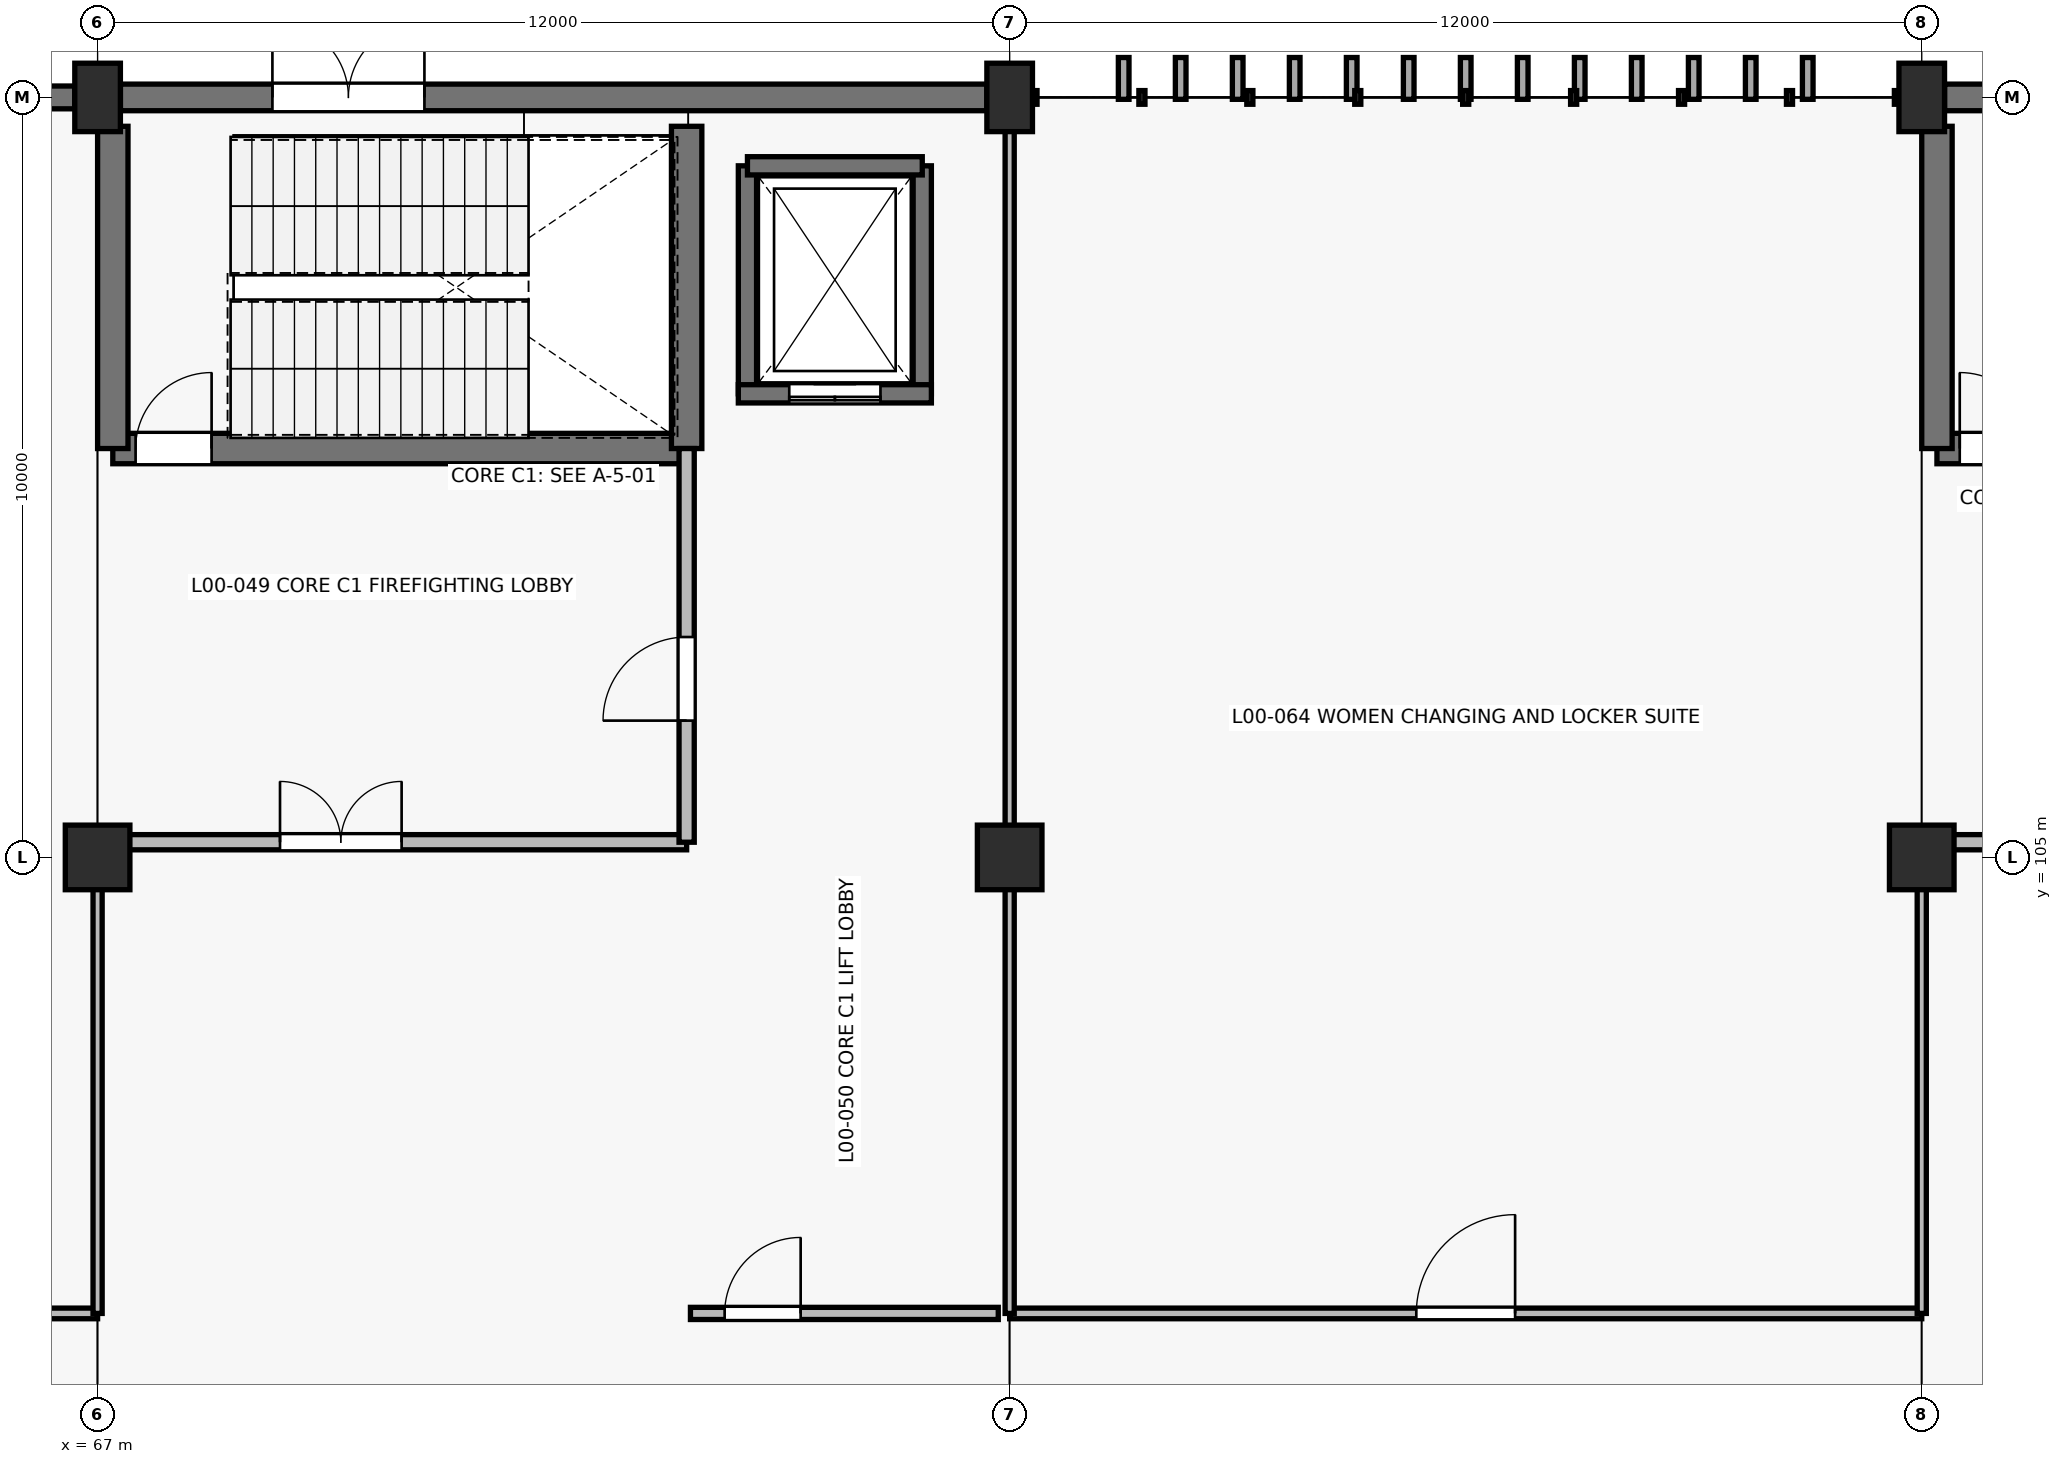
"""IFC4 building model, lengths in metres.
Left out: names, types, materials, properties, quantities, classifications, styles, units other than length and angle.
Written with IfcOpenShell. Run it as: python <this file> out.ifc"""

import sys

from ifc_helpers import new_model, si_unit, direction, frame, frame_2d, origin, origin_2d, place, context, subcontext, project, spatial, rectangle, extrude, element, fill, save


model = new_model("IFC4")
c1 = context("Model", 3, precision=1e-05, world=origin(), true_north=direction((0.0, 1.0)))
c2 = subcontext(c1, "Body", "Model", "MODEL_VIEW")
j1 = project(units=[si_unit("LENGTHUNIT", "METRE"), si_unit("PLANEANGLEUNIT", "RADIAN")], contexts=[c1])
p1 = place(None, origin())
s1 = spatial("IfcSite", under=j1, at=p1, CompositionType="ELEMENT")
p2 = place(p1, origin())
s2 = spatial("IfcBuilding", under=s1, at=p2, CompositionType="ELEMENT")
p3 = place(p2, origin())
s3 = spatial("IfcBuildingStorey", under=s2, at=p3, CompositionType="ELEMENT", Elevation=0.0)
p4 = place(p3, frame((67.0, 105.0, 0.0), z_axis=(0.0, 0.0, 1.0), x_axis=(1.0, 0.0, 0.0)))
e1 = element("IfcColumn", 1, at=p4, inside=s3, PredefinedType="COLUMN", context=c2, shape_type="SweptSolid", body=[
    extrude(rectangle(XDim=0.85, YDim=0.85, at=origin_2d()), origin(), (0.0, 0.0, 1.0), 4.8),
])
p5 = place(p3, frame((67.0, 115.0, 0.0), z_axis=(0.0, 0.0, 1.0), x_axis=(1.0, 0.0, 0.0)))
e2 = element("IfcColumn", 2, at=p5, inside=s3, PredefinedType="COLUMN", context=c2, shape_type="SweptSolid", body=[
    extrude(rectangle(XDim=0.6, YDim=0.9, at=origin_2d()), origin(), (0.0, 0.0, 1.0), 4.8),
])
p6 = place(p3, frame((79.0, 105.0, 0.0), z_axis=(0.0, 0.0, 1.0), x_axis=(1.0, 0.0, 0.0)))
e3 = element("IfcColumn", 3, at=p6, inside=s3, PredefinedType="COLUMN", context=c2, shape_type="SweptSolid", body=[
    extrude(rectangle(XDim=0.85, YDim=0.85, at=origin_2d()), origin(), (0.0, 0.0, 1.0), 4.8),
])
p7 = place(p3, frame((79.0, 115.0, 0.0), z_axis=(0.0, 0.0, 1.0), x_axis=(1.0, 0.0, 0.0)))
e4 = element("IfcColumn", 4, at=p7, inside=s3, PredefinedType="COLUMN", context=c2, shape_type="SweptSolid", body=[
    extrude(rectangle(XDim=0.6, YDim=0.9, at=origin_2d()), origin(), (0.0, 0.0, 1.0), 4.8),
])
p8 = place(p3, frame((91.0, 105.0, 0.0), z_axis=(0.0, 0.0, 1.0), x_axis=(1.0, 0.0, 0.0)))
e5 = element("IfcColumn", 5, at=p8, inside=s3, PredefinedType="COLUMN", context=c2, shape_type="SweptSolid", body=[
    extrude(rectangle(XDim=0.85, YDim=0.85, at=origin_2d()), origin(), (0.0, 0.0, 1.0), 4.8),
])
p9 = place(p3, frame((91.0, 115.0, 0.0), z_axis=(0.0, 0.0, 1.0), x_axis=(1.0, 0.0, 0.0)))
e6 = element("IfcColumn", 6, at=p9, inside=s3, PredefinedType="COLUMN", context=c2, shape_type="SweptSolid", body=[
    extrude(rectangle(XDim=0.6, YDim=0.9, at=origin_2d()), origin(), (0.0, 0.0, 1.0), 4.8),
])
p10 = place(p3, frame((55.3, 115.0, 0.0), z_axis=(0.0, 0.0, 1.0), x_axis=(1.0, 0.0, 0.0)))
e7 = element("IfcWall", 7, at=p10, inside=s3, PredefinedType="SOLIDWALL", context=c2, shape_type="SweptSolid", body=[
    extrude(rectangle(XDim=11.4, YDim=0.3, at=frame_2d((5.7, 0.0))), origin(), (0.0, 0.0, 1.0), 4.8),
])
p11 = place(p10, frame((4.2, 0.0, 0.0)))
e8 = element("IfcOpeningElement", 8, at=p11, cuts=e7, PredefinedType="OPENING", context=c2, shape_type="SweptSolid", body=[
    extrude(rectangle(XDim=2.2, YDim=2.4, at=frame_2d((1.1, 1.2))), frame((0.0, 0.16, 0.0), z_axis=(0.0, -1.0, 0.0), x_axis=(1.0, 0.0, 0.0)), (0.0, 0.0, 1.0), 0.32),
])
p12 = place(p3, frame((67.3, 115.0, 0.0), z_axis=(0.0, 0.0, 1.0), x_axis=(1.0, 0.0, 0.0)))
e9 = element("IfcWall", 9, at=p12, inside=s3, PredefinedType="SOLIDWALL", context=c2, shape_type="SweptSolid", body=[
    extrude(rectangle(XDim=11.4, YDim=0.35, at=frame_2d((5.7, 0.0))), origin(), (0.0, 0.0, 1.0), 4.8),
])
p13 = place(p12, frame((2.0, 0.0, 0.0)))
e10 = element("IfcOpeningElement", 10, at=p13, cuts=e9, PredefinedType="OPENING", context=c2, shape_type="SweptSolid", body=[
    extrude(rectangle(XDim=2.0, YDim=2.3, at=frame_2d((1.0, 1.15))), frame((0.0, 0.185, 0.0), z_axis=(0.0, -1.0, 0.0), x_axis=(1.0, 0.0, 0.0)), (0.0, 0.0, 1.0), 0.37),
])
p14 = place(p3, frame((91.3, 115.0, 0.0), z_axis=(0.0, 0.0, 1.0), x_axis=(1.0, 0.0, 0.0)))
e11 = element("IfcWall", 11, at=p14, inside=s3, PredefinedType="SOLIDWALL", context=c2, shape_type="SweptSolid", body=[
    extrude(rectangle(XDim=9.4, YDim=0.35, at=frame_2d((4.7, 0.0))), origin(), (0.0, 0.0, 1.0), 4.8),
])
p15 = place(p14, frame((2.0, 0.0, 0.0)))
e12 = element("IfcOpeningElement", 12, at=p15, cuts=e11, PredefinedType="OPENING", context=c2, shape_type="SweptSolid", body=[
    extrude(rectangle(XDim=2.0, YDim=2.3, at=frame_2d((1.0, 1.15))), frame((0.0, 0.185, 0.0), z_axis=(0.0, -1.0, 0.0), x_axis=(1.0, 0.0, 0.0)), (0.0, 0.0, 1.0), 0.37),
])
for number, where, z_axis, x_axis in (
    (13, (75.55, 111.1, 0.0), (0.0, 0.0, 1.0), (0.0, 1.0, 0.0)),
    (14, (77.85, 114.1, 0.0), (0.0, 0.0, 1.0), (0.0, -1.0, 0.0)),
):
    element("IfcWall", number, at=place(p3, frame(where, z_axis=z_axis, x_axis=x_axis)), inside=s3, PredefinedType="SHEAR", context=c2, shape_type="SweptSolid", body=[
        extrude(rectangle(XDim=3.0, YDim=0.24, at=frame_2d((1.5, 0.0))), origin(), (0.0, 0.0, 1.0), 4.8),
    ])
p16 = place(p3, frame((75.55, 114.1, 0.0), z_axis=(0.0, 0.0, 1.0), x_axis=(1.0, 0.0, 0.0)))
e15 = element("IfcWall", 15, at=p16, inside=s3, PredefinedType="SHEAR", context=c2, shape_type="SweptSolid", body=[
    extrude(rectangle(XDim=2.3, YDim=0.24, at=frame_2d((1.15, 0.0))), origin(), (0.0, 0.0, 1.0), 4.8),
])
p17 = place(p3, frame((77.97, 111.1, 0.0), z_axis=(0.0, 0.0, 1.0), x_axis=(-1.0, 0.0, 0.0)))
e16 = element("IfcWall", 16, at=p17, inside=s3, PredefinedType="SHEAR", context=c2, shape_type="SweptSolid", body=[
    extrude(rectangle(XDim=2.54, YDim=0.24, at=frame_2d((1.27, 0.0))), origin(), (0.0, 0.0, 1.0), 4.8),
])
p18 = place(p17, frame((0.67, 0.0, 0.0)))
e17 = element("IfcOpeningElement", 17, at=p18, cuts=e16, PredefinedType="OPENING", context=c2, shape_type="SweptSolid", body=[
    extrude(rectangle(XDim=1.2, YDim=2.15, at=frame_2d((0.6, 1.075))), frame((0.0, 0.13, 0.0), z_axis=(0.0, -1.0, 0.0), x_axis=(1.0, 0.0, 0.0)), (0.0, 0.0, 1.0), 0.26),
])
p19 = place(p3, frame((67.2, 110.38, 0.0), z_axis=(0.0, 0.0, 1.0), x_axis=(1.0, 0.0, 0.0)))
e18 = element("IfcWall", 18, at=p19, inside=s3, PredefinedType="SHEAR", context=c2, shape_type="SweptSolid", body=[
    extrude(rectangle(XDim=7.55, YDim=0.4, at=frame_2d((3.775, 0.0))), origin(), (0.0, 0.0, 1.0), 4.8),
])
p20 = place(p19, frame((0.3, 0.0, 0.0)))
e19 = element("IfcOpeningElement", 19, at=p20, cuts=e18, PredefinedType="OPENING", context=c2, shape_type="SweptSolid", body=[
    extrude(rectangle(XDim=1.0, YDim=2.15, at=frame_2d((0.5, 1.075))), frame((0.0, 0.21, 0.0), z_axis=(0.0, -1.0, 0.0), x_axis=(1.0, 0.0, 0.0)), (0.0, 0.0, 1.0), 0.42),
])
for number, where, z_axis, x_axis in (
    (20, (74.75, 110.38, 0.0), (0.0, 0.0, 1.0), (0.0, 1.0, 0.0)),
    (21, (67.2, 114.62, 0.0), (0.0, 0.0, 1.0), (0.0, -1.0, 0.0)),
):
    element("IfcWall", number, at=place(p3, frame(where, z_axis=z_axis, x_axis=x_axis)), inside=s3, PredefinedType="SHEAR", context=c2, shape_type="SweptSolid", body=[
        extrude(rectangle(XDim=4.24, YDim=0.4, at=frame_2d((2.12, 0.0))), origin(), (0.0, 0.0, 1.0), 4.8),
    ])
p21 = place(p3, frame((67.2, 105.2, 0.0), z_axis=(0.0, 0.0, 1.0), x_axis=(1.0, 0.0, 0.0)))
e22 = element("IfcWall", 22, at=p21, inside=s3, PredefinedType="PARTITIONING", context=c2, shape_type="SweptSolid", body=[
    extrude(rectangle(XDim=7.55, YDim=0.2, at=frame_2d((3.775, 0.0))), origin(), (0.0, 0.0, 1.0), 3.525),
])
p22 = place(p21, frame((2.2, 0.0, 0.0)))
e23 = element("IfcOpeningElement", 23, at=p22, cuts=e22, PredefinedType="OPENING", context=c2, shape_type="SweptSolid", body=[
    extrude(rectangle(XDim=1.6, YDim=2.2, at=frame_2d((0.8, 1.1))), frame((0.0, 0.11, 0.0), z_axis=(0.0, -1.0, 0.0), x_axis=(1.0, 0.0, 0.0)), (0.0, 0.0, 1.0), 0.22),
])
p23 = place(p3, frame((74.75, 105.2, 0.0), z_axis=(0.0, 0.0, 1.0), x_axis=(0.0, 1.0, 0.0)))
e24 = element("IfcWall", 24, at=p23, inside=s3, PredefinedType="PARTITIONING", context=c2, shape_type="SweptSolid", body=[
    extrude(rectangle(XDim=5.18, YDim=0.2, at=frame_2d((2.59, 0.0))), origin(), (0.0, 0.0, 1.0), 3.625),
])
p24 = place(p23, frame((1.6, 0.0, 0.0)))
e25 = element("IfcOpeningElement", 25, at=p24, cuts=e24, PredefinedType="OPENING", context=c2, shape_type="SweptSolid", body=[
    extrude(rectangle(XDim=1.1, YDim=2.15, at=frame_2d((0.55, 1.075))), frame((0.0, 0.11, 0.0), z_axis=(0.0, -1.0, 0.0), x_axis=(1.0, 0.0, 0.0)), (0.0, 0.0, 1.0), 0.22),
])
p25 = place(p3, frame((74.8, 99.0, 0.0), z_axis=(0.0, 0.0, 1.0), x_axis=(1.0, 0.0, 0.0)))
e26 = element("IfcWall", 26, at=p25, inside=s3, PredefinedType="PARTITIONING", context=c2, shape_type="SweptSolid", body=[
    extrude(rectangle(XDim=4.05, YDim=0.16, at=frame_2d((2.025, 0.0))), origin(), (0.0, 0.0, 1.0), 3.525),
])
p26 = place(p25, frame((0.45, 0.0, 0.0)))
e27 = element("IfcOpeningElement", 27, at=p26, cuts=e26, PredefinedType="OPENING", context=c2, shape_type="SweptSolid", body=[
    extrude(rectangle(XDim=1.0, YDim=2.15, at=frame_2d((0.5, 1.075))), frame((0.0, 0.09, 0.0), z_axis=(0.0, -1.0, 0.0), x_axis=(1.0, 0.0, 0.0)), (0.0, 0.0, 1.0), 0.18),
])
p27 = place(p3, frame((91.2, 110.38, 0.0), z_axis=(0.0, 0.0, 1.0), x_axis=(1.0, 0.0, 0.0)))
e28 = element("IfcWall", 28, at=p27, inside=s3, PredefinedType="SHEAR", context=c2, shape_type="SweptSolid", body=[
    extrude(rectangle(XDim=7.1, YDim=0.4, at=frame_2d((3.55, 0.0))), origin(), (0.0, 0.0, 1.0), 4.8),
])
p28 = place(p27, frame((0.3, 0.0, 0.0)))
e29 = element("IfcOpeningElement", 29, at=p28, cuts=e28, PredefinedType="OPENING", context=c2, shape_type="SweptSolid", body=[
    extrude(rectangle(XDim=1.0, YDim=2.15, at=frame_2d((0.5, 1.075))), frame((0.0, 0.21, 0.0), z_axis=(0.0, -1.0, 0.0), x_axis=(1.0, 0.0, 0.0)), (0.0, 0.0, 1.0), 0.42),
])
p29 = place(p3, frame((91.2, 114.62, 0.0), z_axis=(0.0, 0.0, 1.0), x_axis=(0.0, -1.0, 0.0)))
e30 = element("IfcWall", 30, at=p29, inside=s3, PredefinedType="SHEAR", context=c2, shape_type="SweptSolid", body=[
    extrude(rectangle(XDim=4.24, YDim=0.4, at=frame_2d((2.12, 0.0))), origin(), (0.0, 0.0, 1.0), 4.8),
])
p30 = place(p3, frame((91.2, 105.2, 0.0), z_axis=(0.0, 0.0, 1.0), x_axis=(1.0, 0.0, 0.0)))
e31 = element("IfcWall", 31, at=p30, inside=s3, PredefinedType="PARTITIONING", context=c2, shape_type="SweptSolid", body=[
    extrude(rectangle(XDim=7.1, YDim=0.2, at=frame_2d((3.55, 0.0))), origin(), (0.0, 0.0, 1.0), 3.525),
])
p31 = place(p30, frame((2.2, 0.0, 0.0)))
e32 = element("IfcOpeningElement", 32, at=p31, cuts=e31, PredefinedType="OPENING", context=c2, shape_type="SweptSolid", body=[
    extrude(rectangle(XDim=1.6, YDim=2.2, at=frame_2d((0.8, 1.1))), frame((0.0, 0.11, 0.0), z_axis=(0.0, -1.0, 0.0), x_axis=(1.0, 0.0, 0.0)), (0.0, 0.0, 1.0), 0.22),
])
p32 = place(p3, frame((43.18, 99.0, 0.0), z_axis=(0.0, 0.0, 1.0), x_axis=(1.0, 0.0, 0.0)))
e33 = element("IfcWall", 33, at=p32, inside=s3, PredefinedType="PARTITIONING", context=c2, shape_type="SweptSolid", body=[
    extrude(rectangle(XDim=23.82, YDim=0.14, at=frame_2d((11.91, 0.0))), origin(), (0.0, 0.0, 1.0), 3.525),
])
p33 = place(p32, frame((11.06, 0.0, 0.0)))
e34 = element("IfcOpeningElement", 34, at=p33, cuts=e33, PredefinedType="OPENING", context=c2, shape_type="SweptSolid", body=[
    extrude(rectangle(XDim=1.7, YDim=2.25, at=frame_2d((0.85, 1.125))), frame((0.0, 0.08, 0.0), z_axis=(0.0, -1.0, 0.0), x_axis=(1.0, 0.0, 0.0)), (0.0, 0.0, 1.0), 0.16),
])
p34 = place(p3, frame((67.0, 99.0, 0.0), z_axis=(0.0, 0.0, 1.0), x_axis=(0.0, 1.0, 0.0)))
e35 = element("IfcWall", 35, at=p34, inside=s3, PredefinedType="PARTITIONING", context=c2, shape_type="SweptSolid", body=[
    extrude(rectangle(XDim=6.2, YDim=0.12, at=frame_2d((3.1, 0.0))), origin(), (0.0, 0.0, 1.0), 3.525),
])
p35 = place(p3, frame((79.0, 99.0, 0.0), z_axis=(0.0, 0.0, 1.0), x_axis=(1.0, 0.0, 0.0)))
e36 = element("IfcWall", 36, at=p35, inside=s3, PredefinedType="PARTITIONING", context=c2, shape_type="SweptSolid", body=[
    extrude(rectangle(XDim=12.0, YDim=0.14, at=frame_2d((6.0, 0.0))), origin(), (0.0, 0.0, 1.0), 3.525),
])
p36 = place(p35, frame((5.35, 0.0, 0.0)))
e37 = element("IfcOpeningElement", 37, at=p36, cuts=e36, PredefinedType="OPENING", context=c2, shape_type="SweptSolid", body=[
    extrude(rectangle(XDim=1.3, YDim=2.2, at=frame_2d((0.65, 1.1))), frame((0.0, 0.08, 0.0), z_axis=(0.0, -1.0, 0.0), x_axis=(1.0, 0.0, 0.0)), (0.0, 0.0, 1.0), 0.16),
])
p37 = place(p3, frame((79.0, 99.0, 0.0), z_axis=(0.0, 0.0, 1.0), x_axis=(0.0, 1.0, 0.0)))
e38 = element("IfcWall", 38, at=p37, inside=s3, PredefinedType="PARTITIONING", context=c2, shape_type="SweptSolid", body=[
    extrude(rectangle(XDim=15.75, YDim=0.12, at=frame_2d((7.875, 0.0))), origin(), (0.0, 0.0, 1.0), 3.525),
])
p38 = place(p3, frame((91.0, 99.0, 0.0), z_axis=(0.0, 0.0, 1.0), x_axis=(0.0, 1.0, 0.0)))
e39 = element("IfcWall", 39, at=p38, inside=s3, PredefinedType="PARTITIONING", context=c2, shape_type="SweptSolid", body=[
    extrude(rectangle(XDim=6.2, YDim=0.12, at=frame_2d((3.1, 0.0))), origin(), (0.0, 0.0, 1.0), 3.525),
])
p39 = place(p13, origin())
e40 = element("IfcDoor", 40, at=p39, inside=s3, OperationType="DOUBLE_DOOR_SINGLE_SWING", PredefinedType="DOOR", context=c2, shape_type="SweptSolid", body=[
    extrude(rectangle(XDim=2.0, YDim=2.3, at=frame_2d((1.0, 1.15))), frame((0.0, 0.025, 0.0), z_axis=(0.0, -1.0, 0.0), x_axis=(1.0, 0.0, 0.0)), (0.0, 0.0, 1.0), 0.05),
])
fill(e10, e40)
p40 = place(p18, origin())
e41 = element("IfcDoor", 41, at=p40, inside=s3, OperationType="DOUBLE_DOOR_SLIDING", PredefinedType="USERDEFINED", context=c2, shape_type="SweptSolid", body=[
    extrude(rectangle(XDim=1.2, YDim=2.15, at=frame_2d((0.6, 1.075))), frame((0.0, 0.025, 0.0), z_axis=(0.0, -1.0, 0.0), x_axis=(1.0, 0.0, 0.0)), (0.0, 0.0, 1.0), 0.05),
])
fill(e17, e41)
p41 = place(p20, origin())
e42 = element("IfcDoor", 42, at=p41, inside=s3, OperationType="SINGLE_SWING_RIGHT", PredefinedType="DOOR", context=c2, shape_type="SweptSolid", body=[
    extrude(rectangle(XDim=1.0, YDim=2.15, at=frame_2d((0.5, 1.075))), frame((0.0, 0.025, 0.0), z_axis=(0.0, -1.0, 0.0), x_axis=(1.0, 0.0, 0.0)), (0.0, 0.0, 1.0), 0.05),
])
fill(e19, e42)
p42 = place(p22, origin())
e43 = element("IfcDoor", 43, at=p42, inside=s3, OperationType="DOUBLE_DOOR_SINGLE_SWING", PredefinedType="DOOR", context=c2, shape_type="SweptSolid", body=[
    extrude(rectangle(XDim=1.6, YDim=2.2, at=frame_2d((0.8, 1.1))), frame((0.0, 0.025, 0.0), z_axis=(0.0, -1.0, 0.0), x_axis=(1.0, 0.0, 0.0)), (0.0, 0.0, 1.0), 0.05),
])
fill(e23, e43)
p43 = place(p24, origin())
e44 = element("IfcDoor", 44, at=p43, inside=s3, OperationType="SINGLE_SWING_LEFT", PredefinedType="DOOR", context=c2, shape_type="SweptSolid", body=[
    extrude(rectangle(XDim=1.1, YDim=2.15, at=frame_2d((0.55, 1.075))), frame((0.0, 0.025, 0.0), z_axis=(0.0, -1.0, 0.0), x_axis=(1.0, 0.0, 0.0)), (0.0, 0.0, 1.0), 0.05),
])
fill(e25, e44)
p44 = place(p26, origin())
e45 = element("IfcDoor", 45, at=p44, inside=s3, OperationType="SINGLE_SWING_RIGHT", PredefinedType="DOOR", context=c2, shape_type="SweptSolid", body=[
    extrude(rectangle(XDim=1.0, YDim=2.15, at=frame_2d((0.5, 1.075))), frame((0.0, 0.025, 0.0), z_axis=(0.0, -1.0, 0.0), x_axis=(1.0, 0.0, 0.0)), (0.0, 0.0, 1.0), 0.05),
])
fill(e27, e45)
p45 = place(p28, origin())
e46 = element("IfcDoor", 46, at=p45, inside=s3, OperationType="SINGLE_SWING_LEFT", PredefinedType="DOOR", context=c2, shape_type="SweptSolid", body=[
    extrude(rectangle(XDim=1.0, YDim=2.15, at=frame_2d((0.5, 1.075))), frame((0.0, 0.025, 0.0), z_axis=(0.0, -1.0, 0.0), x_axis=(1.0, 0.0, 0.0)), (0.0, 0.0, 1.0), 0.05),
])
fill(e29, e46)
p46 = place(p36, origin())
e47 = element("IfcDoor", 47, at=p46, inside=s3, OperationType="SINGLE_SWING_RIGHT", PredefinedType="DOOR", context=c2, shape_type="SweptSolid", body=[
    extrude(rectangle(XDim=1.3, YDim=2.2, at=frame_2d((0.65, 1.1))), frame((0.0, 0.025, 0.0), z_axis=(0.0, -1.0, 0.0), x_axis=(1.0, 0.0, 0.0)), (0.0, 0.0, 1.0), 0.05),
])
fill(e37, e47)
save(model, sys.argv[1])
